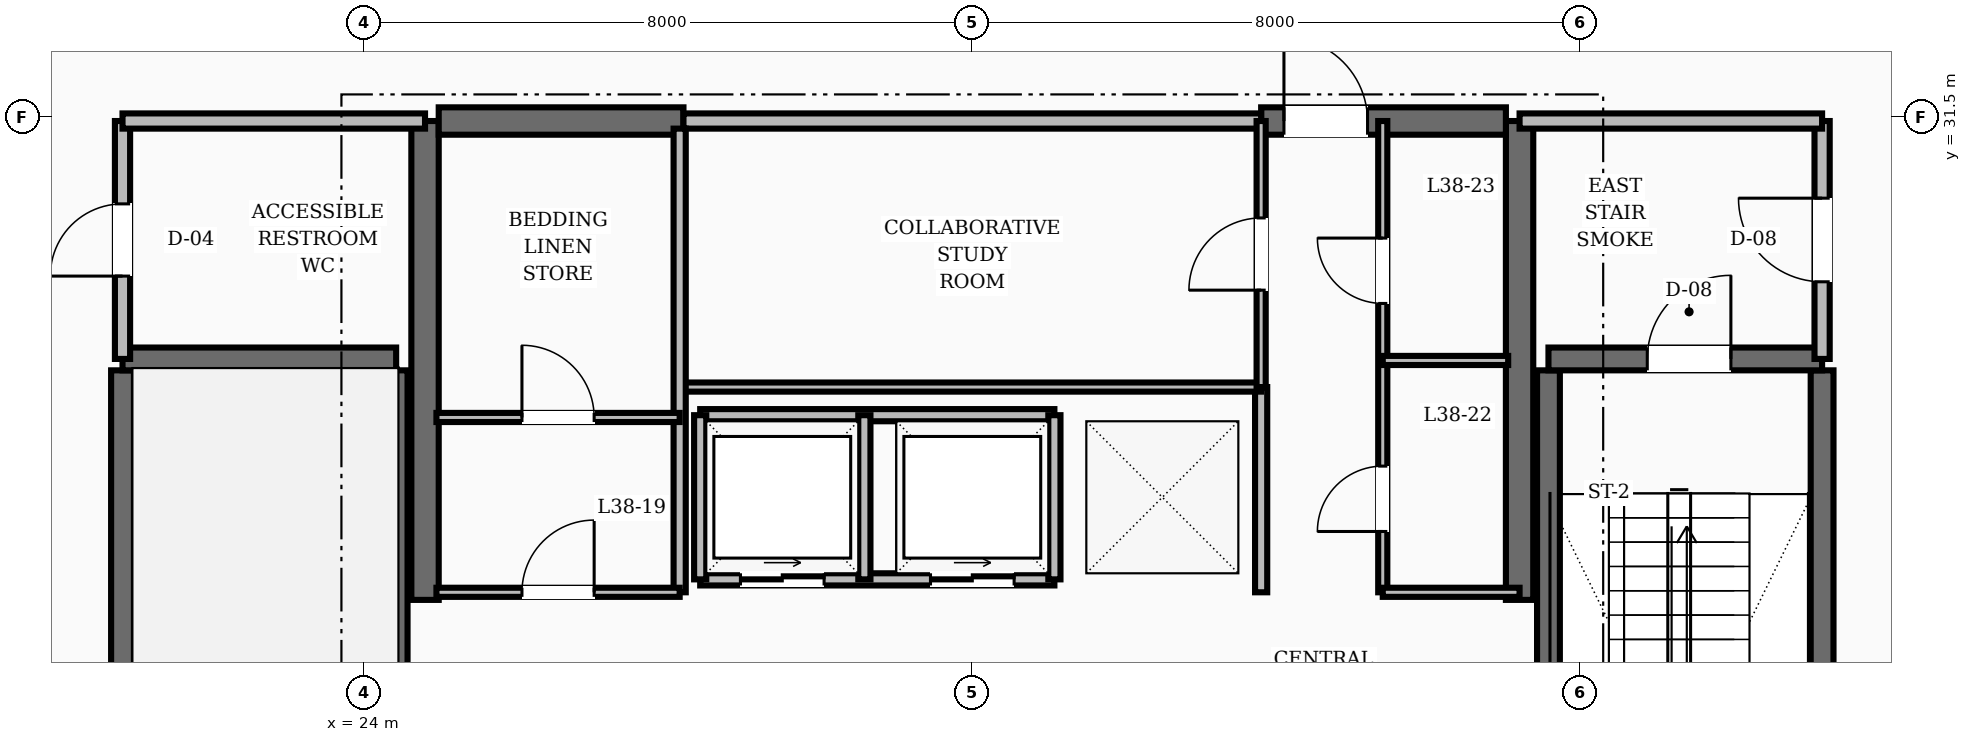
"""IFC4 building model, lengths in metres.
Left out: names, types, materials, properties, quantities, classifications, styles, units other than length and angle.
Written with IfcOpenShell. Run it as: python <this file> out.ifc"""

import sys

from ifc_helpers import new_model, si_unit, direction, frame, frame_2d, origin, place, context, subcontext, project, spatial, rectangle, extrude, element, fill, save


model = new_model("IFC4")
c1 = context("Model", 3, precision=1e-05, world=origin(), true_north=direction((0.0, 1.0)))
c2 = subcontext(c1, "Body", "Model", "MODEL_VIEW")
j1 = project(units=[si_unit("LENGTHUNIT", "METRE"), si_unit("PLANEANGLEUNIT", "RADIAN")], contexts=[c1])
p1 = place(None, origin())
s1 = spatial("IfcSite", under=j1, at=p1, CompositionType="ELEMENT")
p2 = place(p1, origin())
s2 = spatial("IfcBuilding", under=s1, at=p2, CompositionType="ELEMENT")
p3 = place(p2, frame((0.0, 0.0, 149.6)))
s3 = spatial("IfcBuildingStorey", under=s2, at=p3, CompositionType="ELEMENT", Elevation=149.6)
for number, where, z_axis, x_axis in (
    (1, (24.8, 25.15, 0.0), (0.0, 0.0, 1.0), (0.0, 1.0, 0.0)),
    (2, (39.2, 25.15, 0.0), (0.0, 0.0, 1.0), (0.0, 1.0, 0.0)),
):
    element("IfcWall", number, at=place(p3, frame(where, z_axis=z_axis, x_axis=x_axis)), inside=s3, PredefinedType="SHEAR", context=c2, shape_type="SweptSolid", body=[
        extrude(rectangle(XDim=6.3, YDim=0.36, at=frame_2d((3.15, 0.0))), origin(), (0.0, 0.0, 1.0), 3.6),
    ])
p4 = place(p3, frame((24.98, 31.45, 0.0), z_axis=(0.0, 0.0, 1.0), x_axis=(1.0, 0.0, 0.0)))
e3 = element("IfcWall", 3, at=p4, inside=s3, PredefinedType="SHEAR", context=c2, shape_type="SweptSolid", body=[
    extrude(rectangle(XDim=3.22, YDim=0.36, at=frame_2d((1.61, 0.0))), origin(), (0.0, 0.0, 1.0), 3.6),
])
p5 = place(p3, frame((35.8, 31.45, 0.0), z_axis=(0.0, 0.0, 1.0), x_axis=(1.0, 0.0, 0.0)))
e4 = element("IfcWall", 4, at=p5, inside=s3, PredefinedType="SHEAR", context=c2, shape_type="SweptSolid", body=[
    extrude(rectangle(XDim=3.22, YDim=0.36, at=frame_2d((1.61, 0.0))), origin(), (0.0, 0.0, 1.0), 3.6),
])
p6 = place(p5, frame((0.3, 0.0, 0.0)))
e5 = element("IfcOpeningElement", 5, at=p6, cuts=e4, PredefinedType="OPENING", context=c2, shape_type="SweptSolid", body=[
    extrude(rectangle(XDim=1.1, YDim=2.1, at=frame_2d((0.55, 1.05))), frame((0.0, 0.19, 0.0), z_axis=(0.0, -1.0, 0.0), x_axis=(1.0, 0.0, 0.0)), (0.0, 0.0, 1.0), 0.38),
])
for number, where, z_axis, x_axis in (
    (6, (20.82, 19.43, 0.0), (0.0, 0.0, 1.0), (0.0, 1.0, 0.0)),
    (7, (24.42, 19.43, 0.0), (0.0, 0.0, 1.0), (0.0, 1.0, 0.0)),
):
    element("IfcWall", number, at=place(p3, frame(where, z_axis=z_axis, x_axis=x_axis)), inside=s3, PredefinedType="SHEAR", context=c2, shape_type="SweptSolid", body=[
        extrude(rectangle(XDim=8.74, YDim=0.3, at=frame_2d((4.37, 0.0))), origin(), (0.0, 0.0, 1.0), 3.6),
    ])
p7 = place(p3, frame((20.82, 28.32, 0.0), z_axis=(0.0, 0.0, 1.0), x_axis=(1.0, 0.0, 0.0)))
e8 = element("IfcWall", 8, at=p7, inside=s3, PredefinedType="SHEAR", context=c2, shape_type="SweptSolid", body=[
    extrude(rectangle(XDim=3.6, YDim=0.3, at=frame_2d((1.8, 0.0))), origin(), (0.0, 0.0, 1.0), 3.6),
])
for number, where, z_axis, x_axis in (
    (9, (43.18, 19.43, 0.0), (0.0, 0.0, 1.0), (0.0, 1.0, 0.0)),
    (10, (39.58, 19.43, 0.0), (0.0, 0.0, 1.0), (0.0, 1.0, 0.0)),
):
    element("IfcWall", number, at=place(p3, frame(where, z_axis=z_axis, x_axis=x_axis)), inside=s3, PredefinedType="SHEAR", context=c2, shape_type="SweptSolid", body=[
        extrude(rectangle(XDim=8.74, YDim=0.3, at=frame_2d((4.37, 0.0))), origin(), (0.0, 0.0, 1.0), 3.6),
    ])
p8 = place(p3, frame((39.58, 28.32, 0.0), z_axis=(0.0, 0.0, 1.0), x_axis=(1.0, 0.0, 0.0)))
e11 = element("IfcWall", 11, at=p8, inside=s3, PredefinedType="SHEAR", context=c2, shape_type="SweptSolid", body=[
    extrude(rectangle(XDim=3.6, YDim=0.3, at=frame_2d((1.8, 0.0))), origin(), (0.0, 0.0, 1.0), 3.6),
])
p9 = place(p8, frame((1.3, 0.0, 0.0)))
e12 = element("IfcOpeningElement", 12, at=p9, cuts=e11, PredefinedType="OPENING", context=c2, shape_type="SweptSolid", body=[
    extrude(rectangle(XDim=1.1, YDim=2.1, at=frame_2d((0.55, 1.05))), frame((0.0, 0.16, 0.0), z_axis=(0.0, -1.0, 0.0), x_axis=(1.0, 0.0, 0.0)), (0.0, 0.0, 1.0), 0.32),
])
p10 = place(p3, frame((43.18, 28.32, 0.0), z_axis=(0.0, 0.0, 1.0), x_axis=(0.0, 1.0, 0.0)))
e13 = element("IfcWall", 13, at=p10, inside=s3, PredefinedType="SOLIDWALL", context=c2, shape_type="SweptSolid", body=[
    extrude(rectangle(XDim=3.13, YDim=0.2, at=frame_2d((1.565, 0.0))), origin(), (0.0, 0.0, 1.0), 2.8),
])
p11 = place(p10, frame((1.015, 0.0, 0.0)))
e14 = element("IfcOpeningElement", 14, at=p11, cuts=e13, PredefinedType="OPENING", context=c2, shape_type="SweptSolid", body=[
    extrude(rectangle(XDim=1.1, YDim=2.1, at=frame_2d((0.55, 1.05))), frame((0.0, 0.11, 0.0), z_axis=(0.0, -1.0, 0.0), x_axis=(1.0, 0.0, 0.0)), (0.0, 0.0, 1.0), 0.22),
])
p12 = place(p3, frame((39.2, 31.45, 0.0), z_axis=(0.0, 0.0, 1.0), x_axis=(1.0, 0.0, 0.0)))
e15 = element("IfcWall", 15, at=p12, inside=s3, PredefinedType="SOLIDWALL", context=c2, shape_type="SweptSolid", body=[
    extrude(rectangle(XDim=3.98, YDim=0.2, at=frame_2d((1.99, 0.0))), origin(), (0.0, 0.0, 1.0), 2.8),
])
p13 = place(p3, frame((20.82, 28.32, 0.0), z_axis=(0.0, 0.0, 1.0), x_axis=(0.0, 1.0, 0.0)))
e16 = element("IfcWall", 16, at=p13, inside=s3, PredefinedType="SOLIDWALL", context=c2, shape_type="SweptSolid", body=[
    extrude(rectangle(XDim=3.13, YDim=0.2, at=frame_2d((1.565, 0.0))), origin(), (0.0, 0.0, 1.0), 2.8),
])
p14 = place(p13, frame((1.09, 0.0, 0.0)))
e17 = element("IfcOpeningElement", 17, at=p14, cuts=e16, PredefinedType="OPENING", context=c2, shape_type="SweptSolid", body=[
    extrude(rectangle(XDim=0.95, YDim=2.1, at=frame_2d((0.475, 1.05))), frame((0.0, 0.11, 0.0), z_axis=(0.0, -1.0, 0.0), x_axis=(1.0, 0.0, 0.0)), (0.0, 0.0, 1.0), 0.22),
])
p15 = place(p3, frame((20.82, 31.45, 0.0), z_axis=(0.0, 0.0, 1.0), x_axis=(1.0, 0.0, 0.0)))
e18 = element("IfcWall", 18, at=p15, inside=s3, PredefinedType="SOLIDWALL", context=c2, shape_type="SweptSolid", body=[
    extrude(rectangle(XDim=3.98, YDim=0.2, at=frame_2d((1.99, 0.0))), origin(), (0.0, 0.0, 1.0), 2.8),
])
p16 = place(p3, frame((35.8, 25.25, 0.0), z_axis=(0.0, 0.0, 1.0), x_axis=(0.0, 1.0, 0.0)))
e19 = element("IfcWall", 19, at=p16, inside=s3, PredefinedType="SOLIDWALL", context=c2, shape_type="SweptSolid", body=[
    extrude(rectangle(XDim=2.7, YDim=0.16, at=frame_2d((1.35, 0.0))), origin(), (0.0, 0.0, 1.0), 2.8),
])
p17 = place(p3, frame((28.42, 25.42, 0.0), z_axis=(0.0, 0.0, 1.0), x_axis=(1.0, 0.0, 0.0)))
e20 = element("IfcWall", 20, at=p17, inside=s3, PredefinedType="SOLIDWALL", context=c2, shape_type="SweptSolid", body=[
    extrude(rectangle(XDim=4.66, YDim=0.16, at=frame_2d((2.33, 0.0))), origin(), (0.0, 0.0, 1.0), 2.8),
])
p18 = place(p17, frame((0.53, 0.0, 0.0)))
e21 = element("IfcOpeningElement", 21, at=p18, cuts=e20, PredefinedType="OPENING", context=c2, shape_type="SweptSolid", body=[
    extrude(rectangle(XDim=1.1, YDim=2.15, at=frame_2d((0.55, 1.075))), frame((0.0, 0.09, 0.0), z_axis=(0.0, -1.0, 0.0), x_axis=(1.0, 0.0, 0.0)), (0.0, 0.0, 1.0), 0.18),
])
p19 = place(p17, frame((3.03, 0.0, 0.0)))
e22 = element("IfcOpeningElement", 22, at=p19, cuts=e20, PredefinedType="OPENING", context=c2, shape_type="SweptSolid", body=[
    extrude(rectangle(XDim=1.1, YDim=2.15, at=frame_2d((0.55, 1.075))), frame((0.0, 0.09, 0.0), z_axis=(0.0, -1.0, 0.0), x_axis=(1.0, 0.0, 0.0)), (0.0, 0.0, 1.0), 0.18),
])
p20 = place(p3, frame((28.42, 27.58, 0.0), z_axis=(0.0, 0.0, 1.0), x_axis=(1.0, 0.0, 0.0)))
e23 = element("IfcWall", 23, at=p20, inside=s3, PredefinedType="SOLIDWALL", context=c2, shape_type="SweptSolid", body=[
    extrude(rectangle(XDim=4.66, YDim=0.16, at=frame_2d((2.33, 0.0))), origin(), (0.0, 0.0, 1.0), 2.8),
])
for number, where, z_axis, x_axis in (
    (24, (28.42, 25.42, 0.0), (0.0, 0.0, 1.0), (0.0, 1.0, 0.0)),
    (25, (30.58, 25.42, 0.0), (0.0, 0.0, 1.0), (0.0, 1.0, 0.0)),
    (26, (33.08, 25.42, 0.0), (0.0, 0.0, 1.0), (0.0, 1.0, 0.0)),
):
    element("IfcWall", number, at=place(p3, frame(where, z_axis=z_axis, x_axis=x_axis)), inside=s3, PredefinedType="SOLIDWALL", context=c2, shape_type="SweptSolid", body=[
        extrude(rectangle(XDim=2.16, YDim=0.16, at=frame_2d((1.08, 0.0))), origin(), (0.0, 0.0, 1.0), 2.8),
    ])
p21 = place(p3, frame((28.2, 31.45, 0.0), z_axis=(0.0, 0.0, 1.0), x_axis=(1.0, 0.0, 0.0)))
e27 = element("IfcWall", 27, at=p21, inside=s3, PredefinedType="SOLIDWALL", context=c2, shape_type="SweptSolid", body=[
    extrude(rectangle(XDim=7.6, YDim=0.2, at=frame_2d((3.8, 0.0))), origin(), (0.0, 0.0, 1.0), 2.8),
])
p22 = place(p3, frame((28.2, 27.95, 0.0), z_axis=(0.0, 0.0, 1.0), x_axis=(1.0, 0.0, 0.0)))
e28 = element("IfcWall", 28, at=p22, inside=s3, PredefinedType="PARTITIONING", context=c2, shape_type="SweptSolid", body=[
    extrude(rectangle(XDim=7.6, YDim=0.12, at=frame_2d((3.8, 0.0))), origin(), (0.0, 0.0, 1.0), 2.8),
])
p23 = place(p3, frame((35.8, 27.95, 0.0), z_axis=(0.0, 0.0, 1.0), x_axis=(0.0, 1.0, 0.0)))
e29 = element("IfcWall", 29, at=p23, inside=s3, PredefinedType="PARTITIONING", context=c2, shape_type="SweptSolid", body=[
    extrude(rectangle(XDim=3.5, YDim=0.12, at=frame_2d((1.75, 0.0))), origin(), (0.0, 0.0, 1.0), 2.8),
])
p24 = place(p23, frame((1.275, 0.0, 0.0)))
e30 = element("IfcOpeningElement", 30, at=p24, cuts=e29, PredefinedType="OPENING", context=c2, shape_type="SweptSolid", body=[
    extrude(rectangle(XDim=0.95, YDim=2.1, at=frame_2d((0.475, 1.05))), frame((0.0, 0.07, 0.0), z_axis=(0.0, -1.0, 0.0), x_axis=(1.0, 0.0, 0.0)), (0.0, 0.0, 1.0), 0.14),
])
p25 = place(p3, frame((28.15, 25.25, 0.0), z_axis=(0.0, 0.0, 1.0), x_axis=(0.0, 1.0, 0.0)))
e31 = element("IfcWall", 31, at=p25, inside=s3, PredefinedType="SOLIDWALL", context=c2, shape_type="SweptSolid", body=[
    extrude(rectangle(XDim=6.1, YDim=0.16, at=frame_2d((3.05, 0.0))), origin(), (0.0, 0.0, 1.0), 2.8),
])
p26 = place(p3, frame((24.95, 25.25, 0.0), z_axis=(0.0, 0.0, 1.0), x_axis=(1.0, 0.0, 0.0)))
e32 = element("IfcWall", 32, at=p26, inside=s3, PredefinedType="PARTITIONING", context=c2, shape_type="SweptSolid", body=[
    extrude(rectangle(XDim=3.2, YDim=0.12, at=frame_2d((1.6, 0.0))), origin(), (0.0, 0.0, 1.0), 2.8),
])
p27 = place(p26, frame((1.125, 0.0, 0.0)))
e33 = element("IfcOpeningElement", 33, at=p27, cuts=e32, PredefinedType="OPENING", context=c2, shape_type="SweptSolid", body=[
    extrude(rectangle(XDim=0.95, YDim=2.1, at=frame_2d((0.475, 1.05))), frame((0.0, 0.07, 0.0), z_axis=(0.0, -1.0, 0.0), x_axis=(1.0, 0.0, 0.0)), (0.0, 0.0, 1.0), 0.14),
])
p28 = place(p3, frame((37.4, 25.25, 0.0), z_axis=(0.0, 0.0, 1.0), x_axis=(0.0, 1.0, 0.0)))
e34 = element("IfcWall", 34, at=p28, inside=s3, PredefinedType="PARTITIONING", context=c2, shape_type="SweptSolid", body=[
    extrude(rectangle(XDim=6.2, YDim=0.12, at=frame_2d((3.1, 0.0))), origin(), (0.0, 0.0, 1.0), 2.8),
])
p29 = place(p28, frame((0.8, 0.0, 0.0)))
e35 = element("IfcOpeningElement", 35, at=p29, cuts=e34, PredefinedType="OPENING", context=c2, shape_type="SweptSolid", body=[
    extrude(rectangle(XDim=0.86, YDim=2.1, at=frame_2d((0.43, 1.05))), frame((0.0, 0.07, 0.0), z_axis=(0.0, -1.0, 0.0), x_axis=(1.0, 0.0, 0.0)), (0.0, 0.0, 1.0), 0.14),
])
p30 = place(p28, frame((3.8, 0.0, 0.0)))
e36 = element("IfcOpeningElement", 36, at=p30, cuts=e34, PredefinedType="OPENING", context=c2, shape_type="SweptSolid", body=[
    extrude(rectangle(XDim=0.86, YDim=2.1, at=frame_2d((0.43, 1.05))), frame((0.0, 0.07, 0.0), z_axis=(0.0, -1.0, 0.0), x_axis=(1.0, 0.0, 0.0)), (0.0, 0.0, 1.0), 0.14),
])
p31 = place(p3, frame((37.4, 25.25, 0.0), z_axis=(0.0, 0.0, 1.0), x_axis=(1.0, 0.0, 0.0)))
e37 = element("IfcWall", 37, at=p31, inside=s3, PredefinedType="PARTITIONING", context=c2, shape_type="SweptSolid", body=[
    extrude(rectangle(XDim=1.8, YDim=0.12, at=frame_2d((0.9, 0.0))), origin(), (0.0, 0.0, 1.0), 2.8),
])
p32 = place(p3, frame((24.95, 27.55, 0.0), z_axis=(0.0, 0.0, 1.0), x_axis=(1.0, 0.0, 0.0)))
e38 = element("IfcWall", 38, at=p32, inside=s3, PredefinedType="PARTITIONING", context=c2, shape_type="SweptSolid", body=[
    extrude(rectangle(XDim=3.2, YDim=0.12, at=frame_2d((1.6, 0.0))), origin(), (0.0, 0.0, 1.0), 2.8),
])
p33 = place(p32, frame((1.125, 0.0, 0.0)))
e39 = element("IfcOpeningElement", 39, at=p33, cuts=e38, PredefinedType="OPENING", context=c2, shape_type="SweptSolid", body=[
    extrude(rectangle(XDim=0.95, YDim=2.1, at=frame_2d((0.475, 1.05))), frame((0.0, 0.07, 0.0), z_axis=(0.0, -1.0, 0.0), x_axis=(1.0, 0.0, 0.0)), (0.0, 0.0, 1.0), 0.14),
])
p34 = place(p3, frame((37.4, 28.3, 0.0), z_axis=(0.0, 0.0, 1.0), x_axis=(1.0, 0.0, 0.0)))
e40 = element("IfcWall", 40, at=p34, inside=s3, PredefinedType="PARTITIONING", context=c2, shape_type="SweptSolid", body=[
    extrude(rectangle(XDim=1.65, YDim=0.12, at=frame_2d((0.825, 0.0))), origin(), (0.0, 0.0, 1.0), 2.8),
])
p35 = place(p9, origin())
e41 = element("IfcDoor", 41, at=p35, inside=s3, OperationType="SINGLE_SWING_RIGHT", PredefinedType="DOOR", context=c2, shape_type="SweptSolid", body=[
    extrude(rectangle(XDim=1.1, YDim=2.1, at=frame_2d((0.55, 1.05))), frame((0.0, 0.025, 0.0), z_axis=(0.0, -1.0, 0.0), x_axis=(1.0, 0.0, 0.0)), (0.0, 0.0, 1.0), 0.05),
])
fill(e12, e41)
p36 = place(p11, origin())
e42 = element("IfcDoor", 42, at=p36, inside=s3, OperationType="SINGLE_SWING_RIGHT", PredefinedType="DOOR", context=c2, shape_type="SweptSolid", body=[
    extrude(rectangle(XDim=1.1, YDim=2.1, at=frame_2d((0.55, 1.05))), frame((0.0, 0.025, 0.0), z_axis=(0.0, -1.0, 0.0), x_axis=(1.0, 0.0, 0.0)), (0.0, 0.0, 1.0), 0.05),
])
fill(e14, e42)
p37 = place(p14, origin())
e43 = element("IfcDoor", 43, at=p37, inside=s3, OperationType="SINGLE_SWING_LEFT", PredefinedType="DOOR", context=c2, shape_type="SweptSolid", body=[
    extrude(rectangle(XDim=0.95, YDim=2.1, at=frame_2d((0.475, 1.05))), frame((0.0, 0.025, 0.0), z_axis=(0.0, -1.0, 0.0), x_axis=(1.0, 0.0, 0.0)), (0.0, 0.0, 1.0), 0.05),
])
fill(e17, e43)
p38 = place(p6, origin())
e44 = element("IfcDoor", 44, at=p38, inside=s3, OperationType="SINGLE_SWING_LEFT", PredefinedType="DOOR", context=c2, shape_type="SweptSolid", body=[
    extrude(rectangle(XDim=1.1, YDim=2.1, at=frame_2d((0.55, 1.05))), frame((0.0, 0.025, 0.0), z_axis=(0.0, -1.0, 0.0), x_axis=(1.0, 0.0, 0.0)), (0.0, 0.0, 1.0), 0.05),
])
fill(e5, e44)
p39 = place(p18, origin())
e45 = element("IfcDoor", 45, at=p39, inside=s3, OperationType="SLIDING_TO_RIGHT", PredefinedType="DOOR", context=c2, shape_type="SweptSolid", body=[
    extrude(rectangle(XDim=1.1, YDim=2.15, at=frame_2d((0.55, 1.075))), frame((0.0, 0.025, 0.0), z_axis=(0.0, -1.0, 0.0), x_axis=(1.0, 0.0, 0.0)), (0.0, 0.0, 1.0), 0.05),
])
fill(e21, e45)
p40 = place(p19, origin())
e46 = element("IfcDoor", 46, at=p40, inside=s3, OperationType="SLIDING_TO_RIGHT", PredefinedType="DOOR", context=c2, shape_type="SweptSolid", body=[
    extrude(rectangle(XDim=1.1, YDim=2.15, at=frame_2d((0.55, 1.075))), frame((0.0, 0.025, 0.0), z_axis=(0.0, -1.0, 0.0), x_axis=(1.0, 0.0, 0.0)), (0.0, 0.0, 1.0), 0.05),
])
fill(e22, e46)
p41 = place(p24, origin())
e47 = element("IfcDoor", 47, at=p41, inside=s3, OperationType="SINGLE_SWING_LEFT", PredefinedType="DOOR", context=c2, shape_type="SweptSolid", body=[
    extrude(rectangle(XDim=0.95, YDim=2.1, at=frame_2d((0.475, 1.05))), frame((0.0, 0.025, 0.0), z_axis=(0.0, -1.0, 0.0), x_axis=(1.0, 0.0, 0.0)), (0.0, 0.0, 1.0), 0.05),
])
fill(e30, e47)
p42 = place(p27, origin())
e48 = element("IfcDoor", 48, at=p42, inside=s3, OperationType="SINGLE_SWING_RIGHT", PredefinedType="DOOR", context=c2, shape_type="SweptSolid", body=[
    extrude(rectangle(XDim=0.95, YDim=2.1, at=frame_2d((0.475, 1.05))), frame((0.0, 0.025, 0.0), z_axis=(0.0, -1.0, 0.0), x_axis=(1.0, 0.0, 0.0)), (0.0, 0.0, 1.0), 0.05),
])
fill(e33, e48)
p43 = place(p33, origin())
e49 = element("IfcDoor", 49, at=p43, inside=s3, OperationType="SINGLE_SWING_LEFT", PredefinedType="DOOR", context=c2, shape_type="SweptSolid", body=[
    extrude(rectangle(XDim=0.95, YDim=2.1, at=frame_2d((0.475, 1.05))), frame((0.0, 0.025, 0.0), z_axis=(0.0, -1.0, 0.0), x_axis=(1.0, 0.0, 0.0)), (0.0, 0.0, 1.0), 0.05),
])
fill(e39, e49)
p44 = place(p29, origin())
e50 = element("IfcDoor", 50, at=p44, inside=s3, OperationType="SINGLE_SWING_LEFT", PredefinedType="DOOR", context=c2, shape_type="SweptSolid", body=[
    extrude(rectangle(XDim=0.86, YDim=2.1, at=frame_2d((0.43, 1.05))), frame((0.0, 0.025, 0.0), z_axis=(0.0, -1.0, 0.0), x_axis=(1.0, 0.0, 0.0)), (0.0, 0.0, 1.0), 0.05),
])
fill(e35, e50)
p45 = place(p30, origin())
e51 = element("IfcDoor", 51, at=p45, inside=s3, OperationType="SINGLE_SWING_RIGHT", PredefinedType="DOOR", context=c2, shape_type="SweptSolid", body=[
    extrude(rectangle(XDim=0.86, YDim=2.1, at=frame_2d((0.43, 1.05))), frame((0.0, 0.025, 0.0), z_axis=(0.0, -1.0, 0.0), x_axis=(1.0, 0.0, 0.0)), (0.0, 0.0, 1.0), 0.05),
])
fill(e36, e51)
save(model, sys.argv[1])
